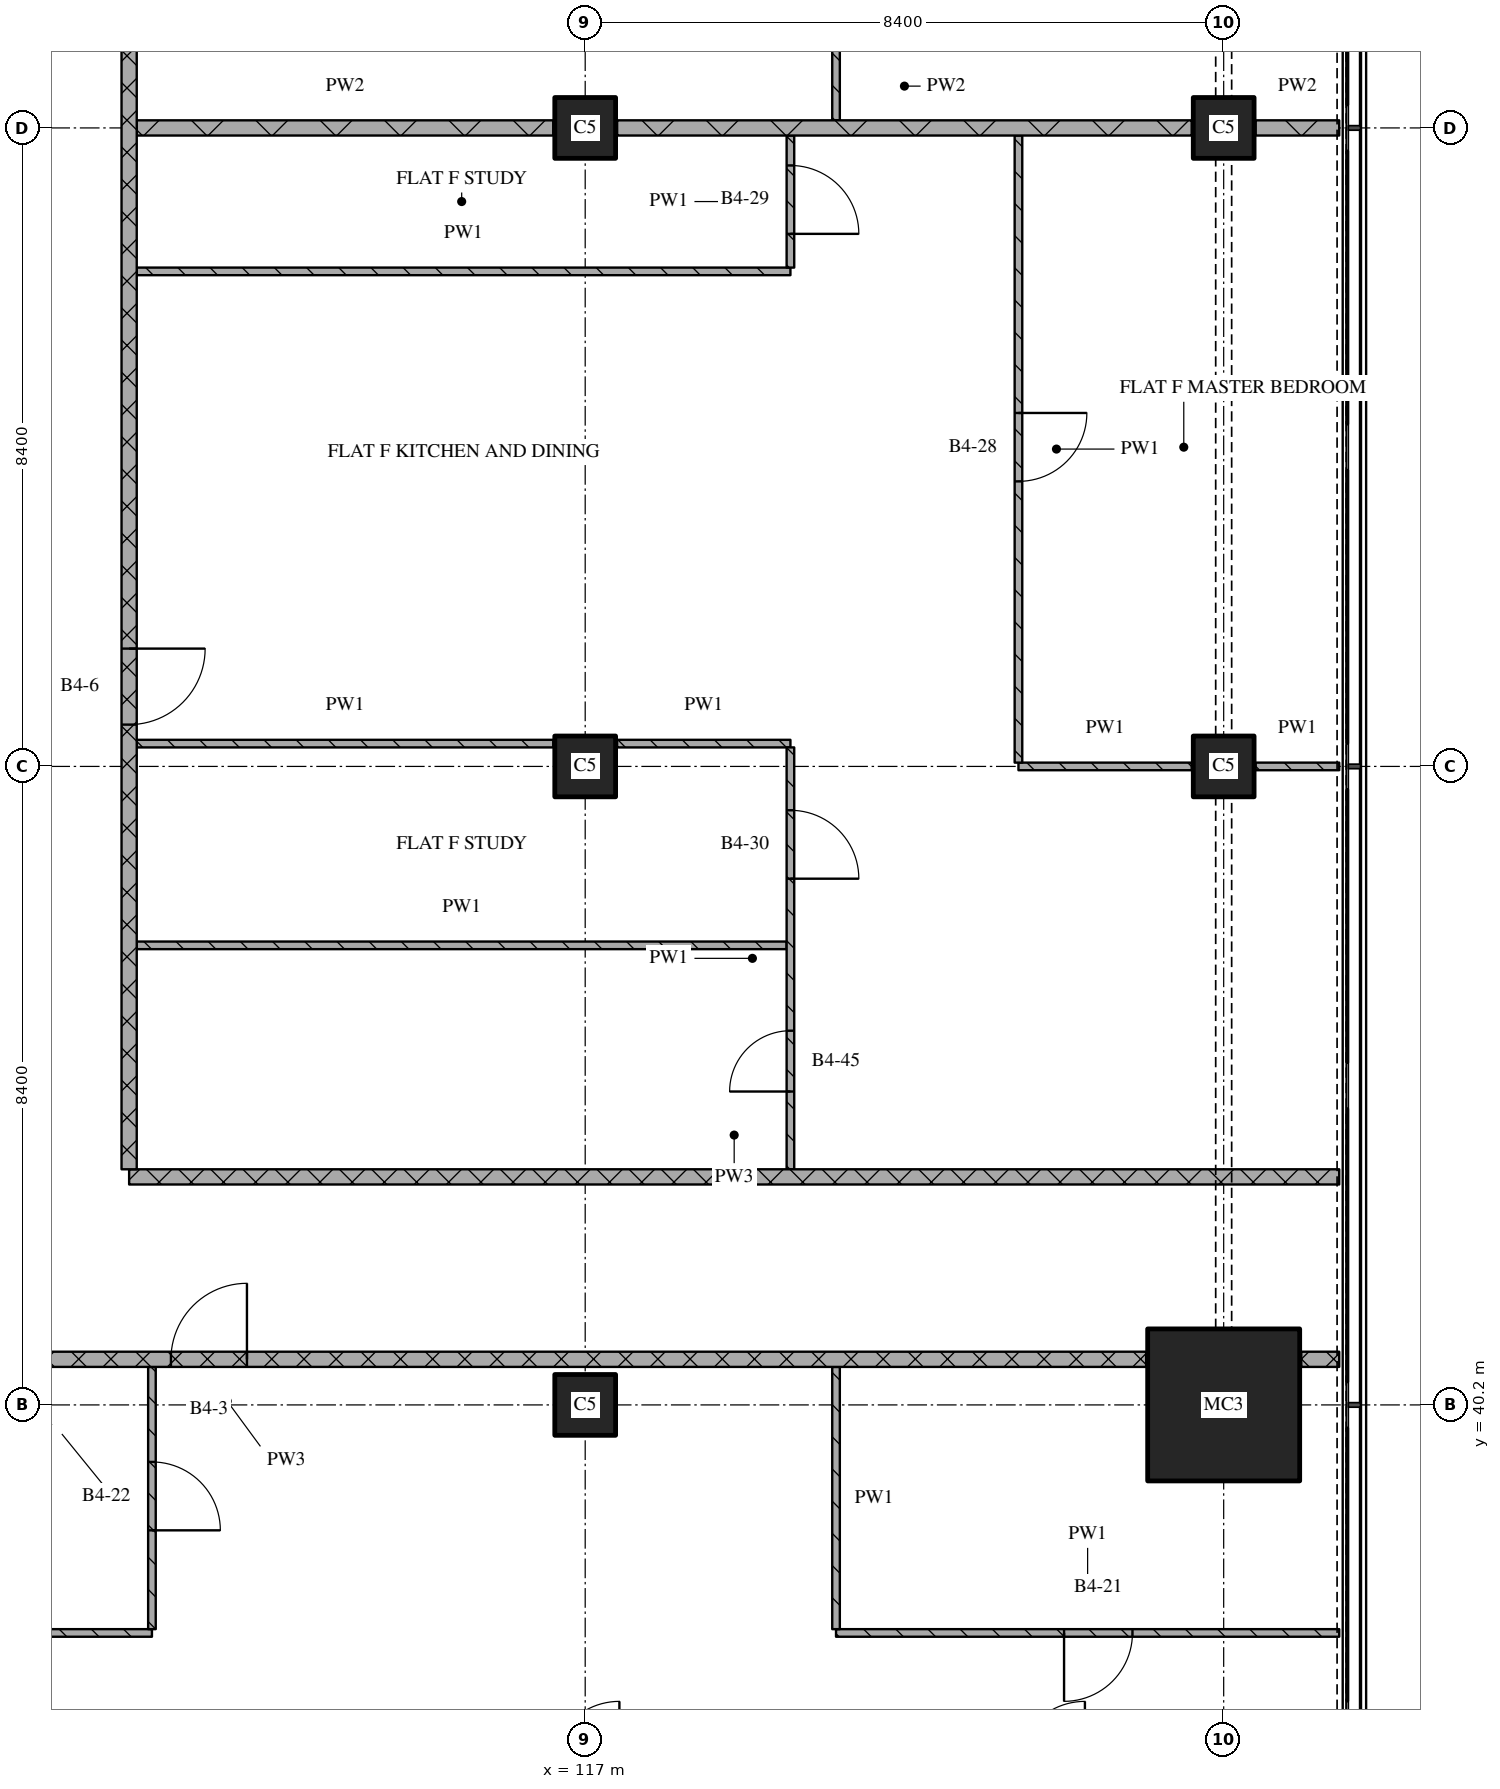
"""IFC4 building model, lengths in metres.
Left out: names, types, materials, properties, quantities, classifications, styles, units other than length and angle.
Written with IfcOpenShell. Run it as: python <this file> out.ifc"""

import sys

from ifc_helpers import new_model, si_unit, direction, frame, frame_2d, origin, origin_2d, place, context, subcontext, project, spatial, rectangle, extrude, element, fill, save


model = new_model("IFC4")
c1 = context("Model", 3, precision=1e-05, world=origin(), true_north=direction((0.0, 1.0)))
c2 = subcontext(c1, "Body", "Model", "MODEL_VIEW")
j1 = project(units=[si_unit("LENGTHUNIT", "METRE"), si_unit("PLANEANGLEUNIT", "RADIAN")], contexts=[c1])
p1 = place(None, origin())
s1 = spatial("IfcSite", under=j1, at=p1, CompositionType="ELEMENT")
p2 = place(p1, origin())
s2 = spatial("IfcBuilding", under=s1, at=p2, CompositionType="ELEMENT")
p3 = place(p2, frame((0.0, 0.0, 127.65)))
s3 = spatial("IfcBuildingStorey", under=s2, at=p3, CompositionType="ELEMENT", Elevation=127.65)
for number, where, z_axis, x_axis in (
    (1, (117.0, 40.2, 0.0), (0.0, 0.0, 1.0), (1.0, 0.0, 0.0)),
    (2, (117.0, 48.6, 0.0), (0.0, 0.0, 1.0), (1.0, 0.0, 0.0)),
    (3, (117.0, 57.0, 0.0), (0.0, 0.0, 1.0), (1.0, 0.0, 0.0)),
):
    element("IfcColumn", number, at=place(p3, frame(where, z_axis=z_axis, x_axis=x_axis)), inside=s3, PredefinedType="COLUMN", context=c2, shape_type="SweptSolid", body=[
        extrude(rectangle(XDim=0.8, YDim=0.8, at=origin_2d()), origin(), (0.0, 0.0, 1.0), 3.6),
    ])
p4 = place(p3, frame((125.4, 40.2, 0.0), z_axis=(0.0, 0.0, 1.0), x_axis=(1.0, 0.0, 0.0)))
e4 = element("IfcColumn", 4, at=p4, inside=s3, PredefinedType="COLUMN", context=c2, shape_type="SweptSolid", body=[
    extrude(rectangle(XDim=2.0, YDim=2.0, at=origin_2d()), origin(), (0.0, 0.0, 1.0), 3.6),
])
for number, where, z_axis, x_axis in (
    (5, (125.4, 48.6, 0.0), (0.0, 0.0, 1.0), (1.0, 0.0, 0.0)),
    (6, (125.4, 57.0, 0.0), (0.0, 0.0, 1.0), (1.0, 0.0, 0.0)),
):
    element("IfcColumn", number, at=place(p3, frame(where, z_axis=z_axis, x_axis=x_axis)), inside=s3, PredefinedType="COLUMN", context=c2, shape_type="SweptSolid", body=[
        extrude(rectangle(XDim=0.8, YDim=0.8, at=origin_2d()), origin(), (0.0, 0.0, 1.0), 3.6),
    ])
p5 = place(p3, frame((100.3, 37.2, 0.0), z_axis=(0.0, 0.0, 1.0), x_axis=(1.0, 0.0, 0.0)))
e7 = element("IfcWall", 7, at=p5, inside=s3, PredefinedType="PARTITIONING", context=c2, shape_type="SweptSolid", body=[
    extrude(rectangle(XDim=11.0, YDim=0.1, at=frame_2d((5.5, 0.0))), origin(), (0.0, 0.0, 1.0), 3.32),
])
p6 = place(p5, frame((1.75, 0.0, 0.0)))
e8 = element("IfcOpeningElement", 8, at=p6, cuts=e7, PredefinedType="OPENING", context=c2, shape_type="SweptSolid", body=[
    extrude(rectangle(XDim=0.8, YDim=2.1, at=frame_2d((0.4, 1.05))), frame((0.0, 0.06, 0.0), z_axis=(0.0, -1.0, 0.0), x_axis=(1.0, 0.0, 0.0)), (0.0, 0.0, 1.0), 0.12),
])
p7 = place(p5, frame((6.25, 0.0, 0.0)))
e9 = element("IfcOpeningElement", 9, at=p7, cuts=e7, PredefinedType="OPENING", context=c2, shape_type="SweptSolid", body=[
    extrude(rectangle(XDim=0.8, YDim=2.1, at=frame_2d((0.4, 1.05))), frame((0.0, 0.06, 0.0), z_axis=(0.0, -1.0, 0.0), x_axis=(1.0, 0.0, 0.0)), (0.0, 0.0, 1.0), 0.12),
])
p8 = place(p3, frame((120.3, 37.2, 0.0), z_axis=(0.0, 0.0, 1.0), x_axis=(1.0, 0.0, 0.0)))
e10 = element("IfcWall", 10, at=p8, inside=s3, PredefinedType="PARTITIONING", context=c2, shape_type="SweptSolid", body=[
    extrude(rectangle(XDim=6.62, YDim=0.1, at=frame_2d((3.31, 0.0))), origin(), (0.0, 0.0, 1.0), 3.32),
])
p9 = place(p8, frame((3.0, 0.0, 0.0)))
e11 = element("IfcOpeningElement", 11, at=p9, cuts=e10, PredefinedType="OPENING", context=c2, shape_type="SweptSolid", body=[
    extrude(rectangle(XDim=0.9, YDim=2.1, at=frame_2d((0.45, 1.05))), frame((0.0, 0.06, 0.0), z_axis=(0.0, -1.0, 0.0), x_axis=(1.0, 0.0, 0.0)), (0.0, 0.0, 1.0), 0.12),
])
p10 = place(p3, frame((124.38, 40.8, 0.0), z_axis=(0.0, 0.0, 1.0), x_axis=(-1.0, 0.0, 0.0)))
e12 = element("IfcWall", 12, at=p10, inside=s3, PredefinedType="PARTITIONING", context=c2, shape_type="SweptSolid", body=[
    extrude(rectangle(XDim=24.18, YDim=0.2, at=frame_2d((12.09, 0.0))), origin(), (0.0, 0.0, 1.0), 3.32),
])
p11 = place(p10, frame((11.83, 0.0, 0.0)))
e13 = element("IfcOpeningElement", 13, at=p11, cuts=e12, PredefinedType="OPENING", context=c2, shape_type="SweptSolid", body=[
    extrude(rectangle(XDim=1.0, YDim=2.1, at=frame_2d((0.5, 1.05))), frame((0.0, 0.11, 0.0), z_axis=(0.0, -1.0, 0.0), x_axis=(1.0, 0.0, 0.0)), (0.0, 0.0, 1.0), 0.22),
])
p12 = place(p3, frame((126.42, 40.8, 0.0), z_axis=(0.0, 0.0, 1.0), x_axis=(1.0, 0.0, 0.0)))
e14 = element("IfcWall", 14, at=p12, inside=s3, PredefinedType="PARTITIONING", context=c2, shape_type="SweptSolid", body=[
    extrude(rectangle(XDim=0.5, YDim=0.2, at=frame_2d((0.25, 0.0))), origin(), (0.0, 0.0, 1.0), 3.32),
])
p13 = place(p3, frame((111.0, 43.2, 0.0), z_axis=(0.0, 0.0, 1.0), x_axis=(1.0, 0.0, 0.0)))
e15 = element("IfcWall", 15, at=p13, inside=s3, PredefinedType="PARTITIONING", context=c2, shape_type="SweptSolid", body=[
    extrude(rectangle(XDim=15.92, YDim=0.2, at=frame_2d((7.96, 0.0))), origin(), (0.0, 0.0, 1.0), 3.32),
])
p14 = place(p3, frame((111.1, 46.246, 0.0), z_axis=(0.0, 0.0, 1.0), x_axis=(1.0, 0.0, 0.0)))
e16 = element("IfcWall", 16, at=p14, inside=s3, PredefinedType="PARTITIONING", context=c2, shape_type="SweptSolid", body=[
    extrude(rectangle(XDim=8.55, YDim=0.1, at=frame_2d((4.275, 0.0))), origin(), (0.0, 0.0, 1.0), 3.32),
])
p15 = place(p3, frame((122.7, 48.6, 0.0), z_axis=(0.0, 0.0, 1.0), x_axis=(1.0, 0.0, 0.0)))
e17 = element("IfcWall", 17, at=p15, inside=s3, PredefinedType="PARTITIONING", context=c2, shape_type="SweptSolid", body=[
    extrude(rectangle(XDim=2.28, YDim=0.1, at=frame_2d((1.14, 0.0))), origin(), (0.0, 0.0, 1.0), 3.32),
])
p16 = place(p3, frame((125.82, 48.6, 0.0), z_axis=(0.0, 0.0, 1.0), x_axis=(1.0, 0.0, 0.0)))
e18 = element("IfcWall", 18, at=p16, inside=s3, PredefinedType="PARTITIONING", context=c2, shape_type="SweptSolid", body=[
    extrude(rectangle(XDim=1.1, YDim=0.1, at=frame_2d((0.55, 0.0))), origin(), (0.0, 0.0, 1.0), 3.32),
])
p17 = place(p3, frame((111.1, 48.9, 0.0), z_axis=(0.0, 0.0, 1.0), x_axis=(1.0, 0.0, 0.0)))
e19 = element("IfcWall", 19, at=p17, inside=s3, PredefinedType="PARTITIONING", context=c2, shape_type="SweptSolid", body=[
    extrude(rectangle(XDim=5.48, YDim=0.1, at=frame_2d((2.74, 0.0))), origin(), (0.0, 0.0, 1.0), 3.32),
])
p18 = place(p3, frame((117.42, 48.9, 0.0), z_axis=(0.0, 0.0, 1.0), x_axis=(1.0, 0.0, 0.0)))
e20 = element("IfcWall", 20, at=p18, inside=s3, PredefinedType="PARTITIONING", context=c2, shape_type="SweptSolid", body=[
    extrude(rectangle(XDim=2.28, YDim=0.1, at=frame_2d((1.14, 0.0))), origin(), (0.0, 0.0, 1.0), 3.32),
])
p19 = place(p3, frame((111.1, 55.113, 0.0), z_axis=(0.0, 0.0, 1.0), x_axis=(1.0, 0.0, 0.0)))
e21 = element("IfcWall", 21, at=p19, inside=s3, PredefinedType="PARTITIONING", context=c2, shape_type="SweptSolid", body=[
    extrude(rectangle(XDim=8.6, YDim=0.1, at=frame_2d((4.3, 0.0))), origin(), (0.0, 0.0, 1.0), 3.32),
])
p20 = place(p3, frame((111.1, 57.0, 0.0), z_axis=(0.0, 0.0, 1.0), x_axis=(1.0, 0.0, 0.0)))
e22 = element("IfcWall", 22, at=p20, inside=s3, PredefinedType="PARTITIONING", context=c2, shape_type="SweptSolid", body=[
    extrude(rectangle(XDim=5.48, YDim=0.2, at=frame_2d((2.74, 0.0))), origin(), (0.0, 0.0, 1.0), 3.32),
])
p21 = place(p3, frame((117.42, 57.0, 0.0), z_axis=(0.0, 0.0, 1.0), x_axis=(1.0, 0.0, 0.0)))
e23 = element("IfcWall", 23, at=p21, inside=s3, PredefinedType="PARTITIONING", context=c2, shape_type="SweptSolid", body=[
    extrude(rectangle(XDim=7.56, YDim=0.2, at=frame_2d((3.78, 0.0))), origin(), (0.0, 0.0, 1.0), 3.32),
])
p22 = place(p3, frame((125.82, 57.0, 0.0), z_axis=(0.0, 0.0, 1.0), x_axis=(1.0, 0.0, 0.0)))
e24 = element("IfcWall", 24, at=p22, inside=s3, PredefinedType="PARTITIONING", context=c2, shape_type="SweptSolid", body=[
    extrude(rectangle(XDim=1.1, YDim=0.2, at=frame_2d((0.55, 0.0))), origin(), (0.0, 0.0, 1.0), 3.32),
])
p23 = place(p3, frame((111.0, 75.32, 0.0), z_axis=(0.0, 0.0, 1.0), x_axis=(0.0, -1.0, 0.0)))
e25 = element("IfcWall", 25, at=p23, inside=s3, PredefinedType="PARTITIONING", context=c2, shape_type="SweptSolid", body=[
    extrude(rectangle(XDim=32.02, YDim=0.2, at=frame_2d((16.01, 0.0))), origin(), (0.0, 0.0, 1.0), 3.32),
])
p24 = place(p23, frame((8.67, 0.0, 0.0)))
e26 = element("IfcOpeningElement", 26, at=p24, cuts=e25, PredefinedType="OPENING", context=c2, shape_type="SweptSolid", body=[
    extrude(rectangle(XDim=1.0, YDim=2.1, at=frame_2d((0.5, 1.05))), frame((0.0, 0.11, 0.0), z_axis=(0.0, -1.0, 0.0), x_axis=(1.0, 0.0, 0.0)), (0.0, 0.0, 1.0), 0.22),
])
p25 = place(p23, frame((25.17, 0.0, 0.0)))
e27 = element("IfcOpeningElement", 27, at=p25, cuts=e25, PredefinedType="OPENING", context=c2, shape_type="SweptSolid", body=[
    extrude(rectangle(XDim=1.0, YDim=2.1, at=frame_2d((0.5, 1.05))), frame((0.0, 0.11, 0.0), z_axis=(0.0, -1.0, 0.0), x_axis=(1.0, 0.0, 0.0)), (0.0, 0.0, 1.0), 0.22),
])
p26 = place(p3, frame((111.3, 37.25, 0.0), z_axis=(0.0, 0.0, 1.0), x_axis=(0.0, 1.0, 0.0)))
e28 = element("IfcWall", 28, at=p26, inside=s3, PredefinedType="PARTITIONING", context=c2, shape_type="SweptSolid", body=[
    extrude(rectangle(XDim=3.45, YDim=0.1, at=frame_2d((1.725, 0.0))), origin(), (0.0, 0.0, 1.0), 3.32),
])
p27 = place(p26, frame((1.3, 0.0, 0.0)))
e29 = element("IfcOpeningElement", 29, at=p27, cuts=e28, PredefinedType="OPENING", context=c2, shape_type="SweptSolid", body=[
    extrude(rectangle(XDim=0.9, YDim=2.1, at=frame_2d((0.45, 1.05))), frame((0.0, 0.06, 0.0), z_axis=(0.0, -1.0, 0.0), x_axis=(1.0, 0.0, 0.0)), (0.0, 0.0, 1.0), 0.12),
])
p28 = place(p3, frame((119.7, 43.3, 0.0), z_axis=(0.0, 0.0, 1.0), x_axis=(0.0, 1.0, 0.0)))
e30 = element("IfcWall", 30, at=p28, inside=s3, PredefinedType="PARTITIONING", context=c2, shape_type="SweptSolid", body=[
    extrude(rectangle(XDim=5.55, YDim=0.1, at=frame_2d((2.775, 0.0))), origin(), (0.0, 0.0, 1.0), 3.32),
])
p29 = place(p28, frame((1.023, 0.0, 0.0)))
e31 = element("IfcOpeningElement", 31, at=p29, cuts=e30, PredefinedType="OPENING", context=c2, shape_type="SweptSolid", body=[
    extrude(rectangle(XDim=0.8, YDim=2.1, at=frame_2d((0.4, 1.05))), frame((0.0, 0.06, 0.0), z_axis=(0.0, -1.0, 0.0), x_axis=(1.0, 0.0, 0.0)), (0.0, 0.0, 1.0), 0.12),
])
p30 = place(p28, frame((3.823, 0.0, 0.0)))
e32 = element("IfcOpeningElement", 32, at=p30, cuts=e30, PredefinedType="OPENING", context=c2, shape_type="SweptSolid", body=[
    extrude(rectangle(XDim=0.9, YDim=2.1, at=frame_2d((0.45, 1.05))), frame((0.0, 0.06, 0.0), z_axis=(0.0, -1.0, 0.0), x_axis=(1.0, 0.0, 0.0)), (0.0, 0.0, 1.0), 0.12),
])
p31 = place(p3, frame((119.7, 55.163, 0.0), z_axis=(0.0, 0.0, 1.0), x_axis=(0.0, 1.0, 0.0)))
e33 = element("IfcWall", 33, at=p31, inside=s3, PredefinedType="PARTITIONING", context=c2, shape_type="SweptSolid", body=[
    extrude(rectangle(XDim=1.737, YDim=0.1, at=frame_2d((0.869, 0.0))), origin(), (0.0, 0.0, 1.0), 3.32),
])
p32 = place(p31, frame((0.444, 0.0, 0.0)))
e34 = element("IfcOpeningElement", 34, at=p32, cuts=e33, PredefinedType="OPENING", context=c2, shape_type="SweptSolid", body=[
    extrude(rectangle(XDim=0.9, YDim=2.1, at=frame_2d((0.45, 1.05))), frame((0.0, 0.06, 0.0), z_axis=(0.0, -1.0, 0.0), x_axis=(1.0, 0.0, 0.0)), (0.0, 0.0, 1.0), 0.12),
])
p33 = place(p3, frame((120.3, 40.7, 0.0), z_axis=(0.0, 0.0, 1.0), x_axis=(0.0, -1.0, 0.0)))
e35 = element("IfcWall", 35, at=p33, inside=s3, PredefinedType="PARTITIONING", context=c2, shape_type="SweptSolid", body=[
    extrude(rectangle(XDim=3.45, YDim=0.1, at=frame_2d((1.725, 0.0))), origin(), (0.0, 0.0, 1.0), 3.32),
])
p34 = place(p3, frame((120.3, 57.1, 0.0), z_axis=(0.0, 0.0, 1.0), x_axis=(0.0, 1.0, 0.0)))
e36 = element("IfcWall", 36, at=p34, inside=s3, PredefinedType="PARTITIONING", context=c2, shape_type="SweptSolid", body=[
    extrude(rectangle(XDim=8.25, YDim=0.1, at=frame_2d((4.125, 0.0))), origin(), (0.0, 0.0, 1.0), 3.32),
])
p35 = place(p34, frame((0.925, 0.0, 0.0)))
e37 = element("IfcOpeningElement", 37, at=p35, cuts=e36, PredefinedType="OPENING", context=c2, shape_type="SweptSolid", body=[
    extrude(rectangle(XDim=0.8, YDim=2.1, at=frame_2d((0.4, 1.05))), frame((0.0, 0.06, 0.0), z_axis=(0.0, -1.0, 0.0), x_axis=(1.0, 0.0, 0.0)), (0.0, 0.0, 1.0), 0.12),
])
p36 = place(p34, frame((3.774, 0.0, 0.0)))
e38 = element("IfcOpeningElement", 38, at=p36, cuts=e36, PredefinedType="OPENING", context=c2, shape_type="SweptSolid", body=[
    extrude(rectangle(XDim=0.8, YDim=2.1, at=frame_2d((0.4, 1.05))), frame((0.0, 0.06, 0.0), z_axis=(0.0, -1.0, 0.0), x_axis=(1.0, 0.0, 0.0)), (0.0, 0.0, 1.0), 0.12),
])
p37 = place(p34, frame((6.5, 0.0, 0.0)))
e39 = element("IfcOpeningElement", 39, at=p37, cuts=e36, PredefinedType="OPENING", context=c2, shape_type="SweptSolid", body=[
    extrude(rectangle(XDim=0.9, YDim=2.1, at=frame_2d((0.45, 1.05))), frame((0.0, 0.06, 0.0), z_axis=(0.0, -1.0, 0.0), x_axis=(1.0, 0.0, 0.0)), (0.0, 0.0, 1.0), 0.12),
])
p38 = place(p3, frame((122.7, 56.9, 0.0), z_axis=(0.0, 0.0, 1.0), x_axis=(0.0, -1.0, 0.0)))
e40 = element("IfcWall", 40, at=p38, inside=s3, PredefinedType="PARTITIONING", context=c2, shape_type="SweptSolid", body=[
    extrude(rectangle(XDim=8.25, YDim=0.1, at=frame_2d((4.125, 0.0))), origin(), (0.0, 0.0, 1.0), 3.32),
])
p39 = place(p38, frame((3.65, 0.0, 0.0)))
e41 = element("IfcOpeningElement", 41, at=p39, cuts=e40, PredefinedType="OPENING", context=c2, shape_type="SweptSolid", body=[
    extrude(rectangle(XDim=0.9, YDim=2.1, at=frame_2d((0.45, 1.05))), frame((0.0, 0.06, 0.0), z_axis=(0.0, -1.0, 0.0), x_axis=(1.0, 0.0, 0.0)), (0.0, 0.0, 1.0), 0.12),
])
p40 = place(p9, origin())
e42 = element("IfcDoor", 42, at=p40, inside=s3, OperationType="SINGLE_SWING_RIGHT", PredefinedType="DOOR", context=c2, shape_type="SweptSolid", body=[
    extrude(rectangle(XDim=0.9, YDim=2.1, at=frame_2d((0.45, 1.05))), frame((0.0, 0.025, 0.0), z_axis=(0.0, -1.0, 0.0), x_axis=(1.0, 0.0, 0.0)), (0.0, 0.0, 1.0), 0.05),
])
fill(e11, e42)
p41 = place(p11, origin())
e43 = element("IfcDoor", 43, at=p41, inside=s3, OperationType="SINGLE_SWING_RIGHT", PredefinedType="DOOR", context=c2, shape_type="SweptSolid", body=[
    extrude(rectangle(XDim=1.0, YDim=2.1, at=frame_2d((0.5, 1.05))), frame((0.0, 0.025, 0.0), z_axis=(0.0, -1.0, 0.0), x_axis=(1.0, 0.0, 0.0)), (0.0, 0.0, 1.0), 0.05),
])
fill(e13, e43)
p42 = place(p25, origin())
e44 = element("IfcDoor", 44, at=p42, inside=s3, OperationType="SINGLE_SWING_LEFT", PredefinedType="DOOR", context=c2, shape_type="SweptSolid", body=[
    extrude(rectangle(XDim=1.0, YDim=2.1, at=frame_2d((0.5, 1.05))), frame((0.0, 0.025, 0.0), z_axis=(0.0, -1.0, 0.0), x_axis=(1.0, 0.0, 0.0)), (0.0, 0.0, 1.0), 0.05),
])
fill(e27, e44)
p43 = place(p27, origin())
e45 = element("IfcDoor", 45, at=p43, inside=s3, OperationType="SINGLE_SWING_RIGHT", PredefinedType="DOOR", context=c2, shape_type="SweptSolid", body=[
    extrude(rectangle(XDim=0.9, YDim=2.1, at=frame_2d((0.45, 1.05))), frame((0.0, 0.025, 0.0), z_axis=(0.0, -1.0, 0.0), x_axis=(1.0, 0.0, 0.0)), (0.0, 0.0, 1.0), 0.05),
])
fill(e29, e45)
p44 = place(p29, origin())
e46 = element("IfcDoor", 46, at=p44, inside=s3, OperationType="SINGLE_SWING_LEFT", PredefinedType="DOOR", context=c2, shape_type="SweptSolid", body=[
    extrude(rectangle(XDim=0.8, YDim=2.1, at=frame_2d((0.4, 1.05))), frame((0.0, 0.025, 0.0), z_axis=(0.0, -1.0, 0.0), x_axis=(1.0, 0.0, 0.0)), (0.0, 0.0, 1.0), 0.05),
])
fill(e31, e46)
p45 = place(p30, origin())
e47 = element("IfcDoor", 47, at=p45, inside=s3, OperationType="SINGLE_SWING_RIGHT", PredefinedType="DOOR", context=c2, shape_type="SweptSolid", body=[
    extrude(rectangle(XDim=0.9, YDim=2.1, at=frame_2d((0.45, 1.05))), frame((0.0, 0.025, 0.0), z_axis=(0.0, -1.0, 0.0), x_axis=(1.0, 0.0, 0.0)), (0.0, 0.0, 1.0), 0.05),
])
fill(e32, e47)
p46 = place(p32, origin())
e48 = element("IfcDoor", 48, at=p46, inside=s3, OperationType="SINGLE_SWING_RIGHT", PredefinedType="DOOR", context=c2, shape_type="SweptSolid", body=[
    extrude(rectangle(XDim=0.9, YDim=2.1, at=frame_2d((0.45, 1.05))), frame((0.0, 0.025, 0.0), z_axis=(0.0, -1.0, 0.0), x_axis=(1.0, 0.0, 0.0)), (0.0, 0.0, 1.0), 0.05),
])
fill(e34, e48)
p47 = place(p39, origin())
e49 = element("IfcDoor", 49, at=p47, inside=s3, OperationType="SINGLE_SWING_LEFT", PredefinedType="DOOR", context=c2, shape_type="SweptSolid", body=[
    extrude(rectangle(XDim=0.9, YDim=2.1, at=frame_2d((0.45, 1.05))), frame((0.0, 0.025, 0.0), z_axis=(0.0, -1.0, 0.0), x_axis=(1.0, 0.0, 0.0)), (0.0, 0.0, 1.0), 0.05),
])
fill(e41, e49)
save(model, sys.argv[1])
